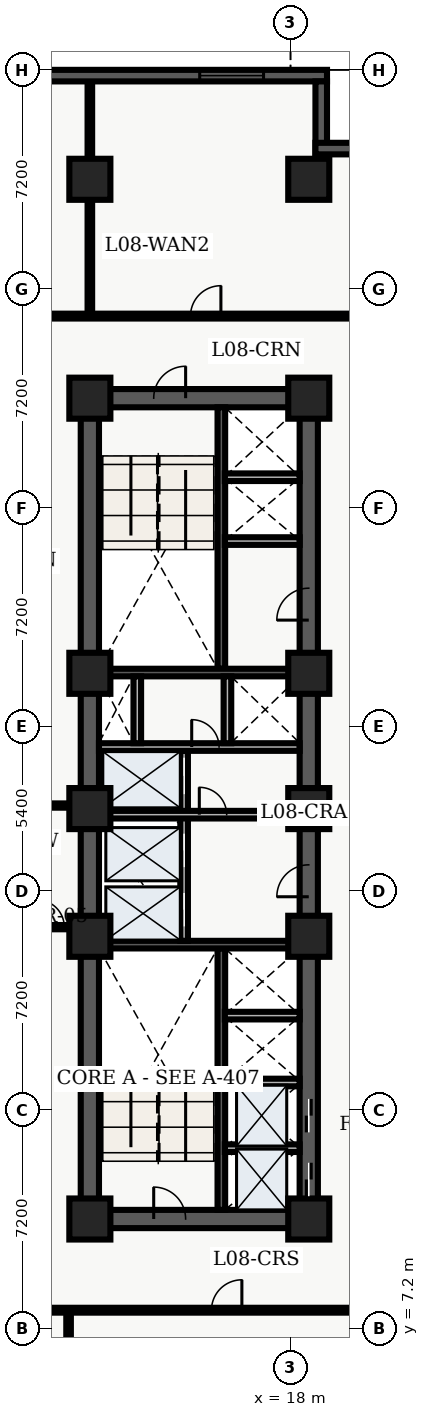
"""IFC4 building model, lengths in metres.
Left out: names, types, materials, properties, quantities, classifications, styles, units other than length and angle.
Written with IfcOpenShell. Run it as: python <this file> out.ifc"""

import sys

from ifc_helpers import new_model, entity, si_unit, converted_unit, direction, frame, origin_with_axes, origin_2d_with_axis, place, context, subcontext, project, spatial, polyline, rectangle, outline, extrude, element, fill, save


model = new_model("IFC4")
c1 = context("Model", 3, precision=1e-05, world=origin_with_axes(), true_north=direction((0.0, 1.0)))
c2 = subcontext(c1, "Body", "Model", "MODEL_VIEW")
j1 = project(units=[si_unit("LENGTHUNIT", "METRE"), converted_unit("PLANEANGLEUNIT", "DEGREE", entity("IfcPlaneAngleMeasure", 0.017), si_unit("PLANEANGLEUNIT", "RADIAN"), dimensions=[0, 0, 0, 0, 0, 0, 0])], contexts=[c1])
p1 = place(None, origin_with_axes())
s1 = spatial("IfcSite", under=j1, at=p1, CompositionType="ELEMENT")
p2 = place(p1, origin_with_axes())
s2 = spatial("IfcBuilding", under=s1, at=p2, CompositionType="ELEMENT")
p3 = place(p2, frame((0.0, 0.0, 36.6), z_axis=(0.0, 0.0, 1.0), x_axis=(1.0, 0.0, 0.0)))
s3 = spatial("IfcBuildingStorey", under=s2, at=p3, CompositionType="ELEMENT", Elevation=36.6)
p4 = place(p3, frame((11.4, 10.8, 0.0), z_axis=(0.0, 0.0, 1.0), x_axis=(0.0, 1.0, 0.0)))
e1 = element("IfcWall", 1, at=p4, inside=s3, PredefinedType="SHEAR", context=c2, shape_type="SweptSolid", body=[
    extrude(outline(polyline([(0.0, -0.3), (27.0, -0.3), (27.0, 0.3), (0.0, 0.3), (0.0, -0.3)])), origin_with_axes(), (0.0, 0.0, 1.0), 3.66),
])
p5 = place(p3, frame((11.4, 10.8, 0.0), z_axis=(0.0, 0.0, 1.0), x_axis=(1.0, 0.0, 0.0)))
e2 = element("IfcWall", 2, at=p5, inside=s3, PredefinedType="SHEAR", context=c2, shape_type="SweptSolid", body=[
    extrude(outline(polyline([(0.0, -0.3), (7.2, -0.3), (7.2, 0.3), (0.0, 0.3), (0.0, -0.3)])), origin_with_axes(), (0.0, 0.0, 1.0), 3.66),
])
p6 = place(p5, frame((2.625, 0.0, 0.0), z_axis=(0.0, 0.0, 1.0), x_axis=(1.0, 0.0, 0.0)))
e3 = element("IfcOpeningElement", 3, at=p6, cuts=e2, PredefinedType="OPENING", context=c2, shape_type="SweptSolid", body=[
    extrude(rectangle(XDim=1.05, YDim=0.62, at=origin_2d_with_axis()), origin_with_axes(), (0.0, 0.0, 1.0), 2.15),
])
p7 = place(p3, frame((11.4, 37.8, 0.0), z_axis=(0.0, 0.0, 1.0), x_axis=(1.0, 0.0, 0.0)))
e4 = element("IfcWall", 4, at=p7, inside=s3, PredefinedType="SHEAR", context=c2, shape_type="SweptSolid", body=[
    extrude(outline(polyline([(0.0, -0.3), (7.2, -0.3), (7.2, 0.3), (0.0, 0.3), (0.0, -0.3)])), origin_with_axes(), (0.0, 0.0, 1.0), 3.66),
])
p8 = place(p7, frame((2.625, 0.0, 0.0), z_axis=(0.0, 0.0, 1.0), x_axis=(1.0, 0.0, 0.0)))
e5 = element("IfcOpeningElement", 5, at=p8, cuts=e4, PredefinedType="OPENING", context=c2, shape_type="SweptSolid", body=[
    extrude(rectangle(XDim=1.05, YDim=0.62, at=origin_2d_with_axis()), origin_with_axes(), (0.0, 0.0, 1.0), 2.15),
])
p9 = place(p3, frame((18.6, 10.8, 0.0), z_axis=(0.0, 0.0, 1.0), x_axis=(0.0, 1.0, 0.0)))
e6 = element("IfcWall", 6, at=p9, inside=s3, PredefinedType="SHEAR", context=c2, shape_type="SweptSolid", body=[
    extrude(outline(polyline([(0.0, -0.3), (13.5, -0.3), (13.5, 0.3), (0.0, 0.3), (0.0, -0.3)])), origin_with_axes(), (0.0, 0.0, 1.0), 3.66),
])
p10 = place(p9, frame((1.3, 0.0, 0.0), z_axis=(0.0, 0.0, 1.0), x_axis=(1.0, 0.0, 0.0)))
e7 = element("IfcOpeningElement", 7, at=p10, cuts=e6, PredefinedType="OPENING", context=c2, shape_type="SweptSolid", body=[
    extrude(rectangle(XDim=1.1, YDim=0.62, at=origin_2d_with_axis()), origin_with_axes(), (0.0, 0.0, 1.0), 2.15),
])
p11 = place(p9, frame((3.4, 0.0, 0.0), z_axis=(0.0, 0.0, 1.0), x_axis=(1.0, 0.0, 0.0)))
e8 = element("IfcOpeningElement", 8, at=p11, cuts=e6, PredefinedType="OPENING", context=c2, shape_type="SweptSolid", body=[
    extrude(rectangle(XDim=1.1, YDim=0.62, at=origin_2d_with_axis()), origin_with_axes(), (0.0, 0.0, 1.0), 2.15),
])
p12 = place(p9, frame((11.125, 0.0, 0.0), z_axis=(0.0, 0.0, 1.0), x_axis=(1.0, 0.0, 0.0)))
e9 = element("IfcOpeningElement", 9, at=p12, cuts=e6, PredefinedType="OPENING", context=c2, shape_type="SweptSolid", body=[
    extrude(rectangle(XDim=1.05, YDim=0.62, at=origin_2d_with_axis()), origin_with_axes(), (0.0, 0.0, 1.0), 2.15),
])
p13 = place(p3, frame((18.6, 24.3, 0.0), z_axis=(0.0, 0.0, 1.0), x_axis=(0.0, 1.0, 0.0)))
e10 = element("IfcWall", 10, at=p13, inside=s3, PredefinedType="SHEAR", context=c2, shape_type="SweptSolid", body=[
    extrude(outline(polyline([(0.0, -0.3), (13.5, -0.3), (13.5, 0.3), (0.0, 0.3), (0.0, -0.3)])), origin_with_axes(), (0.0, 0.0, 1.0), 3.66),
])
p14 = place(p13, frame((6.725, 0.0, 0.0), z_axis=(0.0, 0.0, 1.0), x_axis=(1.0, 0.0, 0.0)))
e11 = element("IfcOpeningElement", 11, at=p14, cuts=e10, PredefinedType="OPENING", context=c2, shape_type="SweptSolid", body=[
    extrude(rectangle(XDim=1.05, YDim=0.62, at=origin_2d_with_axis()), origin_with_axes(), (0.0, 0.0, 1.0), 2.15),
])
p15 = place(p3, frame((15.725, 11.1, 0.0), z_axis=(0.0, 0.0, 1.0), x_axis=(0.0, 1.0, 0.0)))
e12 = element("IfcWall", 12, at=p15, inside=s3, PredefinedType="SHEAR", context=c2, shape_type="SweptSolid", body=[
    extrude(outline(polyline([(0.0, -0.125), (8.6, -0.125), (8.6, 0.125), (0.0, 0.125), (0.0, -0.125)])), origin_with_axes(), (0.0, 0.0, 1.0), 3.66),
])
p16 = place(p3, frame((11.7, 19.825, 0.0), z_axis=(0.0, 0.0, 1.0), x_axis=(1.0, 0.0, 0.0)))
e13 = element("IfcWall", 13, at=p16, inside=s3, PredefinedType="SHEAR", context=c2, shape_type="SweptSolid", body=[
    extrude(outline(polyline([(0.0, -0.125), (6.6, -0.125), (6.6, 0.125), (0.0, 0.125), (0.0, -0.125)])), origin_with_axes(), (0.0, 0.0, 1.0), 3.66),
])
p17 = place(p3, frame((15.725, 28.9, 0.0), z_axis=(0.0, 0.0, 1.0), x_axis=(0.0, 1.0, 0.0)))
e14 = element("IfcWall", 14, at=p17, inside=s3, PredefinedType="SHEAR", context=c2, shape_type="SweptSolid", body=[
    extrude(outline(polyline([(0.0, -0.125), (8.6, -0.125), (8.6, 0.125), (0.0, 0.125), (0.0, -0.125)])), origin_with_axes(), (0.0, 0.0, 1.0), 3.66),
])
p18 = place(p3, frame((11.7, 28.775, 0.0), z_axis=(0.0, 0.0, 1.0), x_axis=(1.0, 0.0, 0.0)))
e15 = element("IfcWall", 15, at=p18, inside=s3, PredefinedType="SHEAR", context=c2, shape_type="SweptSolid", body=[
    extrude(outline(polyline([(0.0, -0.125), (6.6, -0.125), (6.6, 0.125), (0.0, 0.125), (0.0, -0.125)])), origin_with_axes(), (0.0, 0.0, 1.0), 3.66),
])
p19 = place(p3, frame((14.5, 19.95, 0.0), z_axis=(0.0, 0.0, 1.0), x_axis=(0.0, 1.0, 0.0)))
e16 = element("IfcWall", 16, at=p19, inside=s3, PredefinedType="SOLIDWALL", context=c2, shape_type="SweptSolid", body=[
    extrude(outline(polyline([(0.0, -0.125), (6.25, -0.125), (6.25, 0.125), (0.0, 0.125), (0.0, -0.125)])), origin_with_axes(), (0.0, 0.0, 1.0), 2.7),
])
p20 = place(p19, frame((1.025, 0.0, 0.0), z_axis=(0.0, 0.0, 1.0), x_axis=(1.0, 0.0, 0.0)))
e17 = element("IfcOpeningElement", 17, at=p20, cuts=e16, PredefinedType="OPENING", context=c2, shape_type="SweptSolid", body=[
    extrude(rectangle(XDim=1.1, YDim=0.27, at=origin_2d_with_axis()), origin_with_axes(), (0.0, 0.0, 1.0), 2.15),
])
p21 = place(p19, frame((2.975, 0.0, 0.0), z_axis=(0.0, 0.0, 1.0), x_axis=(1.0, 0.0, 0.0)))
e18 = element("IfcOpeningElement", 18, at=p21, cuts=e16, PredefinedType="OPENING", context=c2, shape_type="SweptSolid", body=[
    extrude(rectangle(XDim=1.1, YDim=0.27, at=origin_2d_with_axis()), origin_with_axes(), (0.0, 0.0, 1.0), 2.15),
])
p22 = place(p19, frame((5.425, 0.0, 0.0), z_axis=(0.0, 0.0, 1.0), x_axis=(1.0, 0.0, 0.0)))
e19 = element("IfcOpeningElement", 19, at=p22, cuts=e16, PredefinedType="OPENING", context=c2, shape_type="SweptSolid", body=[
    extrude(rectangle(XDim=1.2, YDim=0.27, at=origin_2d_with_axis()), origin_with_axes(), (0.0, 0.0, 1.0), 2.15),
])
p23 = place(p3, frame((11.7, 24.1, 0.0), z_axis=(0.0, 0.0, 1.0), x_axis=(1.0, 0.0, 0.0)))
e20 = element("IfcWall", 20, at=p23, inside=s3, PredefinedType="SOLIDWALL", context=c2, shape_type="SweptSolid", body=[
    extrude(outline(polyline([(0.0, -0.125), (6.6, -0.125), (6.6, 0.125), (0.0, 0.125), (0.0, -0.125)])), origin_with_axes(), (0.0, 0.0, 1.0), 2.7),
])
p24 = place(p23, frame((3.75, 0.0, 0.0), z_axis=(0.0, 0.0, 1.0), x_axis=(1.0, 0.0, 0.0)))
e21 = element("IfcOpeningElement", 21, at=p24, cuts=e20, PredefinedType="OPENING", context=c2, shape_type="SweptSolid", body=[
    extrude(rectangle(XDim=0.9, YDim=0.27, at=origin_2d_with_axis()), origin_with_axes(), (0.0, 0.0, 1.0), 2.15),
])
p25 = place(p3, frame((11.7, 26.325, 0.0), z_axis=(0.0, 0.0, 1.0), x_axis=(1.0, 0.0, 0.0)))
e22 = element("IfcWall", 22, at=p25, inside=s3, PredefinedType="SOLIDWALL", context=c2, shape_type="SweptSolid", body=[
    extrude(outline(polyline([(0.0, -0.125), (6.6, -0.125), (6.6, 0.125), (0.0, 0.125), (0.0, -0.125)])), origin_with_axes(), (0.0, 0.0, 1.0), 2.7),
])
p26 = place(p25, frame((3.5, 0.0, 0.0), z_axis=(0.0, 0.0, 1.0), x_axis=(1.0, 0.0, 0.0)))
e23 = element("IfcOpeningElement", 23, at=p26, cuts=e22, PredefinedType="OPENING", context=c2, shape_type="SweptSolid", body=[
    extrude(rectangle(XDim=0.9, YDim=0.27, at=origin_2d_with_axis()), origin_with_axes(), (0.0, 0.0, 1.0), 2.15),
])
for number, where, z_axis, x_axis in (
    (24, (12.96, 26.45, 0.0), (0.0, 0.0, 1.0), (0.0, 1.0, 0.0)),
    (25, (15.925, 26.45, 0.0), (0.0, 0.0, 1.0), (0.0, 1.0, 0.0)),
):
    element("IfcWall", number, at=place(p3, frame(where, z_axis=z_axis, x_axis=x_axis)), inside=s3, PredefinedType="SOLIDWALL", context=c2, shape_type="SweptSolid", body=[
        extrude(outline(polyline([(0.0, -0.125), (2.2, -0.125), (2.2, 0.125), (0.0, 0.125), (0.0, -0.125)])), origin_with_axes(), (0.0, 0.0, 1.0), 2.7),
    ])
for number, where, z_axis, x_axis in (
    (26, (11.4, 10.8, 0.0), (0.0, 0.0, 1.0), (1.0, 0.0, 0.0)),
    (27, (11.4, 20.1, 0.0), (0.0, 0.0, 1.0), (1.0, 0.0, 0.0)),
    (28, (11.4, 24.3, 0.0), (0.0, 0.0, 1.0), (1.0, 0.0, 0.0)),
    (29, (11.4, 28.75, 0.0), (0.0, 0.0, 1.0), (1.0, 0.0, 0.0)),
    (30, (11.4, 37.8, 0.0), (0.0, 0.0, 1.0), (1.0, 0.0, 0.0)),
    (31, (11.4, 45.0, 0.0), (0.0, 0.0, 1.0), (1.0, 0.0, 0.0)),
    (32, (18.6, 10.8, 0.0), (0.0, 0.0, 1.0), (1.0, 0.0, 0.0)),
    (33, (18.6, 20.1, 0.0), (0.0, 0.0, 1.0), (1.0, 0.0, 0.0)),
    (34, (18.6, 24.3, 0.0), (0.0, 0.0, 1.0), (1.0, 0.0, 0.0)),
    (35, (18.6, 28.75, 0.0), (0.0, 0.0, 1.0), (1.0, 0.0, 0.0)),
    (36, (18.6, 37.8, 0.0), (0.0, 0.0, 1.0), (1.0, 0.0, 0.0)),
    (37, (18.6, 45.0, 0.0), (0.0, 0.0, 1.0), (1.0, 0.0, 0.0)),
):
    element("IfcColumn", number, at=place(p3, frame(where, z_axis=z_axis, x_axis=x_axis)), inside=s3, PredefinedType="COLUMN", context=c2, shape_type="SweptSolid", body=[
        extrude(rectangle(XDim=1.35, YDim=1.35, at=origin_2d_with_axis()), origin_with_axes(), (0.0, 0.0, 1.0), 3.9),
    ])
for number, where, z_axis, x_axis in (
    (38, (15.84, 13.13, 0.0), (0.0, 0.0, 1.0), (1.0, 0.0, 0.0)),
    (39, (15.84, 15.29, 0.0), (0.0, 0.0, 1.0), (1.0, 0.0, 0.0)),
    (40, (15.84, 17.49, 0.0), (0.0, 0.0, 1.0), (1.0, 0.0, 0.0)),
    (41, (15.84, 33.1, 0.0), (0.0, 0.0, 1.0), (1.0, 0.0, 0.0)),
    (42, (15.84, 35.2, 0.0), (0.0, 0.0, 1.0), (1.0, 0.0, 0.0)),
):
    element("IfcWall", number, at=place(p3, frame(where, z_axis=z_axis, x_axis=x_axis)), inside=s3, PredefinedType="SOLIDWALL", context=c2, shape_type="SweptSolid", body=[
        extrude(outline(polyline([(0.0, -0.125), (2.46, -0.125), (2.46, 0.125), (0.0, 0.125), (0.0, -0.125)])), origin_with_axes(), (0.0, 0.0, 1.0), 2.7),
    ])
p27 = place(p3, frame((9.52, 20.4, 0.0), z_axis=(0.0, 0.0, 1.0), x_axis=(1.0, 0.0, 0.0)))
e43 = element("IfcWall", 43, at=p27, inside=s3, PredefinedType="PARTITIONING", context=c2, shape_type="SweptSolid", body=[
    extrude(outline(polyline([(0.0, -0.07), (1.58, -0.07), (1.58, 0.07), (0.0, 0.07), (0.0, -0.07)])), origin_with_axes(), (0.0, 0.0, 1.0), 2.7),
])
p28 = place(p27, frame((0.59, 0.0, 0.0), z_axis=(0.0, 0.0, 1.0), x_axis=(1.0, 0.0, 0.0)))
e44 = element("IfcOpeningElement", 44, at=p28, cuts=e43, PredefinedType="OPENING", context=c2, shape_type="SweptSolid", body=[
    extrude(rectangle(XDim=0.9, YDim=0.16, at=origin_2d_with_axis()), origin_with_axes(), (0.0, 0.0, 1.0), 2.15),
])
p29 = place(p3, frame((9.52, 24.4, 0.0), z_axis=(0.0, 0.0, 1.0), x_axis=(1.0, 0.0, 0.0)))
e45 = element("IfcWall", 45, at=p29, inside=s3, PredefinedType="PARTITIONING", context=c2, shape_type="SweptSolid", body=[
    extrude(outline(polyline([(0.0, -0.07), (1.58, -0.07), (1.58, 0.07), (0.0, 0.07), (0.0, -0.07)])), origin_with_axes(), (0.0, 0.0, 1.0), 2.7),
])
p30 = place(p3, frame((2.6, 7.8, 0.0), z_axis=(0.0, 0.0, 1.0), x_axis=(1.0, 0.0, 0.0)))
e46 = element("IfcWall", 46, at=p30, inside=s3, PredefinedType="PARTITIONING", context=c2, shape_type="SweptSolid", body=[
    extrude(outline(polyline([(0.0, -0.08), (18.55, -0.08), (18.55, 0.08), (0.0, 0.08), (0.0, -0.08)])), origin_with_axes(), (0.0, 0.0, 1.0), 2.7),
])
p31 = place(p30, frame((3.765, 0.0, 0.0), z_axis=(0.0, 0.0, 1.0), x_axis=(1.0, 0.0, 0.0)))
e47 = element("IfcOpeningElement", 47, at=p31, cuts=e46, PredefinedType="OPENING", context=c2, shape_type="SweptSolid", body=[
    extrude(rectangle(XDim=1.0, YDim=0.18, at=origin_2d_with_axis()), origin_with_axes(), (0.0, 0.0, 1.0), 2.15),
])
p32 = place(p30, frame((13.3, 0.0, 0.0), z_axis=(0.0, 0.0, 1.0), x_axis=(1.0, 0.0, 0.0)))
e48 = element("IfcOpeningElement", 48, at=p32, cuts=e46, PredefinedType="OPENING", context=c2, shape_type="SweptSolid", body=[
    extrude(rectangle(XDim=1.0, YDim=0.18, at=origin_2d_with_axis()), origin_with_axes(), (0.0, 0.0, 1.0), 2.15),
])
p33 = place(p3, frame((2.6, 40.5, 0.0), z_axis=(0.0, 0.0, 1.0), x_axis=(1.0, 0.0, 0.0)))
e49 = element("IfcWall", 49, at=p33, inside=s3, PredefinedType="PARTITIONING", context=c2, shape_type="SweptSolid", body=[
    extrude(outline(polyline([(0.0, -0.08), (18.65, -0.08), (18.65, 0.08), (0.0, 0.08), (0.0, -0.08)])), origin_with_axes(), (0.0, 0.0, 1.0), 2.7),
])
p34 = place(p33, frame((4.395, 0.0, 0.0), z_axis=(0.0, 0.0, 1.0), x_axis=(1.0, 0.0, 0.0)))
e50 = element("IfcOpeningElement", 50, at=p34, cuts=e49, PredefinedType="OPENING", context=c2, shape_type="SweptSolid", body=[
    extrude(rectangle(XDim=1.2, YDim=0.18, at=origin_2d_with_axis()), origin_with_axes(), (0.0, 0.0, 1.0), 2.2),
])
p35 = place(p33, frame((12.61, 0.0, 0.0), z_axis=(0.0, 0.0, 1.0), x_axis=(1.0, 0.0, 0.0)))
e51 = element("IfcOpeningElement", 51, at=p35, cuts=e49, PredefinedType="OPENING", context=c2, shape_type="SweptSolid", body=[
    extrude(rectangle(XDim=1.0, YDim=0.18, at=origin_2d_with_axis()), origin_with_axes(), (0.0, 0.0, 1.0), 2.15),
])
p36 = place(p3, frame((10.7, 0.36, 0.0), z_axis=(0.0, 0.0, 1.0), x_axis=(0.0, 1.0, 0.0)))
e52 = element("IfcWall", 52, at=p36, inside=s3, PredefinedType="PARTITIONING", context=c2, shape_type="SweptSolid", body=[
    extrude(outline(polyline([(0.0, -0.075), (7.34, -0.075), (7.34, 0.075), (0.0, 0.075), (0.0, -0.075)])), origin_with_axes(), (0.0, 0.0, 1.0), 2.7),
])
p37 = place(p3, frame((11.4, 40.6, 0.0), z_axis=(0.0, 0.0, 1.0), x_axis=(0.0, 1.0, 0.0)))
e53 = element("IfcWall", 53, at=p37, inside=s3, PredefinedType="PARTITIONING", context=c2, shape_type="SweptSolid", body=[
    extrude(outline(polyline([(0.0, -0.075), (7.64, -0.075), (7.64, 0.075), (0.0, 0.075), (0.0, -0.075)])), origin_with_axes(), (0.0, 0.0, 1.0), 2.7),
])
p38 = place(p3, frame((2.78, 48.41, 0.0), z_axis=(0.0, 0.0, 1.0), x_axis=(1.0, 0.0, 0.0)))
e54 = element("IfcWall", 54, at=p38, inside=s3, PredefinedType="SOLIDWALL", context=c2, shape_type="SweptSolid", body=[
    extrude(outline(polyline([(0.0, -0.19), (16.42, -0.19), (16.42, 0.19), (0.0, 0.19), (0.0, -0.19)])), origin_with_axes(), (0.0, 0.0, 1.0), 3.66),
])
p39 = place(p38, frame((3.137, 0.0, 0.45), z_axis=(0.0, 0.0, 1.0), x_axis=(1.0, 0.0, 0.0)))
e55 = element("IfcOpeningElement", 55, at=p39, cuts=e54, PredefinedType="OPENING", context=c2, shape_type="SweptSolid", body=[
    extrude(rectangle(XDim=2.1, YDim=0.4, at=origin_2d_with_axis()), origin_with_axes(), (0.0, 0.0, 1.0), 2.2),
])
p40 = place(p38, frame((13.283, 0.0, 0.45), z_axis=(0.0, 0.0, 1.0), x_axis=(1.0, 0.0, 0.0)))
e56 = element("IfcOpeningElement", 56, at=p40, cuts=e54, PredefinedType="OPENING", context=c2, shape_type="SweptSolid", body=[
    extrude(rectangle(XDim=2.1, YDim=0.4, at=origin_2d_with_axis()), origin_with_axes(), (0.0, 0.0, 1.0), 2.2),
])
p41 = place(p3, frame((19.01, 48.22, 0.0), z_axis=(0.0, 0.0, 1.0), x_axis=(0.0, -1.0, 0.0)))
e57 = element("IfcWall", 57, at=p41, inside=s3, PredefinedType="SOLIDWALL", context=c2, shape_type="SweptSolid", body=[
    extrude(outline(polyline([(0.0, -0.19), (2.56, -0.19), (2.56, 0.19), (0.0, 0.19), (0.0, -0.19)])), origin_with_axes(), (0.0, 0.0, 1.0), 3.66),
])
p42 = place(p3, frame((18.82, 46.01, 0.0), z_axis=(0.0, 0.0, 1.0), x_axis=(1.0, 0.0, 0.0)))
e58 = element("IfcWall", 58, at=p42, inside=s3, PredefinedType="SOLIDWALL", context=c2, shape_type="SweptSolid", body=[
    extrude(outline(polyline([(0.0, -0.19), (2.78, -0.19), (2.78, 0.19), (0.0, 0.19), (0.0, -0.19)])), origin_with_axes(), (0.0, 0.0, 1.0), 3.66),
])
p43 = place(p9, frame((1.3, 0.0, 0.0), z_axis=(0.0, 0.0, 1.0), x_axis=(1.0, 0.0, 0.0)))
e59 = element("IfcDoor", 59, at=p43, inside=s3, OperationType="SLIDING_TO_LEFT", PredefinedType="DOOR", context=c2, shape_type="SweptSolid", body=[
    extrude(rectangle(XDim=1.1, YDim=0.09, at=origin_2d_with_axis()), origin_with_axes(), (0.0, 0.0, 1.0), 2.15),
])
fill(e7, e59)
p44 = place(p9, frame((3.4, 0.0, 0.0), z_axis=(0.0, 0.0, 1.0), x_axis=(1.0, 0.0, 0.0)))
e60 = element("IfcDoor", 60, at=p44, inside=s3, OperationType="SLIDING_TO_RIGHT", PredefinedType="DOOR", context=c2, shape_type="SweptSolid", body=[
    extrude(rectangle(XDim=1.1, YDim=0.09, at=origin_2d_with_axis()), origin_with_axes(), (0.0, 0.0, 1.0), 2.15),
])
fill(e8, e60)
p45 = place(p19, frame((1.025, 0.0, 0.0), z_axis=(0.0, 0.0, 1.0), x_axis=(1.0, 0.0, 0.0)))
e61 = element("IfcDoor", 61, at=p45, inside=s3, OperationType="SLIDING_TO_LEFT", PredefinedType="DOOR", context=c2, shape_type="SweptSolid", body=[
    extrude(rectangle(XDim=1.1, YDim=0.09, at=origin_2d_with_axis()), origin_with_axes(), (0.0, 0.0, 1.0), 2.15),
])
fill(e17, e61)
p46 = place(p19, frame((2.975, 0.0, 0.0), z_axis=(0.0, 0.0, 1.0), x_axis=(1.0, 0.0, 0.0)))
e62 = element("IfcDoor", 62, at=p46, inside=s3, OperationType="SLIDING_TO_RIGHT", PredefinedType="DOOR", context=c2, shape_type="SweptSolid", body=[
    extrude(rectangle(XDim=1.1, YDim=0.09, at=origin_2d_with_axis()), origin_with_axes(), (0.0, 0.0, 1.0), 2.15),
])
fill(e18, e62)
p47 = place(p19, frame((5.425, 0.0, 0.0), z_axis=(0.0, 0.0, 1.0), x_axis=(1.0, 0.0, 0.0)))
e63 = element("IfcDoor", 63, at=p47, inside=s3, OperationType="DOUBLE_DOOR_SLIDING", PredefinedType="DOOR", context=c2, shape_type="SweptSolid", body=[
    extrude(rectangle(XDim=1.2, YDim=0.09, at=origin_2d_with_axis()), origin_with_axes(), (0.0, 0.0, 1.0), 2.15),
])
fill(e19, e63)
p48 = place(p5, frame((2.625, 0.0, 0.0), z_axis=(0.0, 0.0, 1.0), x_axis=(1.0, 0.0, 0.0)))
e64 = element("IfcDoor", 64, at=p48, inside=s3, OperationType="SINGLE_SWING_LEFT", PredefinedType="DOOR", context=c2, shape_type="SweptSolid", body=[
    extrude(rectangle(XDim=1.05, YDim=0.09, at=origin_2d_with_axis()), origin_with_axes(), (0.0, 0.0, 1.0), 2.15),
])
fill(e3, e64)
p49 = place(p7, frame((2.625, 0.0, 0.0), z_axis=(0.0, 0.0, 1.0), x_axis=(1.0, 0.0, 0.0)))
e65 = element("IfcDoor", 65, at=p49, inside=s3, OperationType="SINGLE_SWING_RIGHT", PredefinedType="DOOR", context=c2, shape_type="SweptSolid", body=[
    extrude(rectangle(XDim=1.05, YDim=0.09, at=origin_2d_with_axis()), origin_with_axes(), (0.0, 0.0, 1.0), 2.15),
])
fill(e5, e65)
p50 = place(p9, frame((11.125, 0.0, 0.0), z_axis=(0.0, 0.0, 1.0), x_axis=(1.0, 0.0, 0.0)))
e66 = element("IfcDoor", 66, at=p50, inside=s3, OperationType="SINGLE_SWING_LEFT", PredefinedType="DOOR", context=c2, shape_type="SweptSolid", body=[
    extrude(rectangle(XDim=1.05, YDim=0.09, at=origin_2d_with_axis()), origin_with_axes(), (0.0, 0.0, 1.0), 2.15),
])
fill(e9, e66)
p51 = place(p23, frame((3.75, 0.0, 0.0), z_axis=(0.0, 0.0, 1.0), x_axis=(1.0, 0.0, 0.0)))
e67 = element("IfcDoor", 67, at=p51, inside=s3, OperationType="SINGLE_SWING_LEFT", PredefinedType="DOOR", context=c2, shape_type="SweptSolid", body=[
    extrude(rectangle(XDim=0.9, YDim=0.09, at=origin_2d_with_axis()), origin_with_axes(), (0.0, 0.0, 1.0), 2.15),
])
fill(e21, e67)
p52 = place(p25, frame((3.5, 0.0, 0.0), z_axis=(0.0, 0.0, 1.0), x_axis=(1.0, 0.0, 0.0)))
e68 = element("IfcDoor", 68, at=p52, inside=s3, OperationType="SINGLE_SWING_LEFT", PredefinedType="DOOR", context=c2, shape_type="SweptSolid", body=[
    extrude(rectangle(XDim=0.9, YDim=0.09, at=origin_2d_with_axis()), origin_with_axes(), (0.0, 0.0, 1.0), 2.15),
])
fill(e23, e68)
p53 = place(p13, frame((6.725, 0.0, 0.0), z_axis=(0.0, 0.0, 1.0), x_axis=(1.0, 0.0, 0.0)))
e69 = element("IfcDoor", 69, at=p53, inside=s3, OperationType="SINGLE_SWING_LEFT", PredefinedType="DOOR", context=c2, shape_type="SweptSolid", body=[
    extrude(rectangle(XDim=1.05, YDim=0.09, at=origin_2d_with_axis()), origin_with_axes(), (0.0, 0.0, 1.0), 2.15),
])
fill(e11, e69)
p54 = place(p27, frame((0.59, 0.0, 0.0), z_axis=(0.0, 0.0, 1.0), x_axis=(1.0, 0.0, 0.0)))
e70 = element("IfcDoor", 70, at=p54, inside=s3, OperationType="SINGLE_SWING_LEFT", PredefinedType="DOOR", context=c2, shape_type="SweptSolid", body=[
    extrude(rectangle(XDim=0.9, YDim=0.084, at=origin_2d_with_axis()), origin_with_axes(), (0.0, 0.0, 1.0), 2.15),
])
fill(e44, e70)
p55 = place(p30, frame((13.3, 0.0, 0.0), z_axis=(0.0, 0.0, 1.0), x_axis=(1.0, 0.0, 0.0)))
e71 = element("IfcDoor", 71, at=p55, inside=s3, OperationType="SINGLE_SWING_RIGHT", PredefinedType="DOOR", context=c2, shape_type="SweptSolid", body=[
    extrude(rectangle(XDim=1.0, YDim=0.09, at=origin_2d_with_axis()), origin_with_axes(), (0.0, 0.0, 1.0), 2.15),
])
fill(e48, e71)
p56 = place(p33, frame((12.61, 0.0, 0.0), z_axis=(0.0, 0.0, 1.0), x_axis=(1.0, 0.0, 0.0)))
e72 = element("IfcDoor", 72, at=p56, inside=s3, OperationType="SINGLE_SWING_RIGHT", PredefinedType="DOOR", context=c2, shape_type="SweptSolid", body=[
    extrude(rectangle(XDim=1.0, YDim=0.09, at=origin_2d_with_axis()), origin_with_axes(), (0.0, 0.0, 1.0), 2.15),
])
fill(e51, e72)
p57 = place(p38, frame((13.283, 0.0, 0.45), z_axis=(0.0, 0.0, 1.0), x_axis=(1.0, 0.0, 0.0)))
e73 = element("IfcWindow", 73, at=p57, inside=s3, PredefinedType="WINDOW", context=c2, shape_type="SweptSolid", body=[
    extrude(rectangle(XDim=2.1, YDim=0.09, at=origin_2d_with_axis()), origin_with_axes(), (0.0, 0.0, 1.0), 2.2),
])
fill(e56, e73)
save(model, sys.argv[1])
